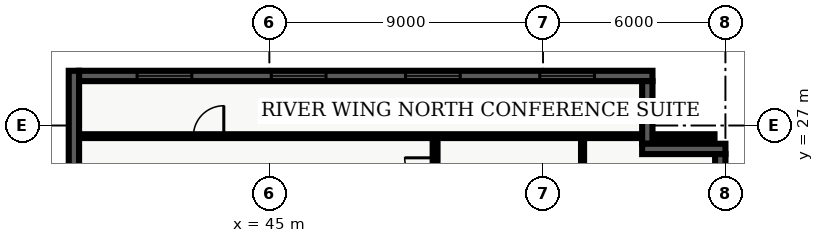
"""IFC4 building model, lengths in metres.
Left out: names, types, materials, properties, quantities, classifications, styles, units other than length and angle.
Written with IfcOpenShell. Run it as: python <this file> out.ifc"""

import sys

from ifc_helpers import new_model, entity, si_unit, converted_unit, direction, frame, origin_with_axes, origin_2d_with_axis, place, context, subcontext, project, spatial, polyline, rectangle, outline, extrude, element, fill, save


model = new_model("IFC4")
c1 = context("Model", 3, precision=1e-05, world=origin_with_axes(), true_north=direction((0.0, 1.0)))
c2 = subcontext(c1, "Body", "Model", "MODEL_VIEW")
j1 = project(units=[si_unit("LENGTHUNIT", "METRE"), converted_unit("PLANEANGLEUNIT", "DEGREE", entity("IfcPlaneAngleMeasure", 0.017), si_unit("PLANEANGLEUNIT", "RADIAN"), dimensions=[0, 0, 0, 0, 0, 0, 0])], contexts=[c1])
p1 = place(None, origin_with_axes())
s1 = spatial("IfcSite", under=j1, at=p1, CompositionType="ELEMENT")
p2 = place(p1, origin_with_axes())
s2 = spatial("IfcBuilding", under=s1, at=p2, CompositionType="ELEMENT")
p3 = place(p2, frame((0.0, 0.0, 200.4), z_axis=(0.0, 0.0, 1.0), x_axis=(1.0, 0.0, 0.0)))
s3 = spatial("IfcBuildingStorey", under=s2, at=p3, CompositionType="ELEMENT", Elevation=200.4)
p4 = place(p3, frame((50.45, 7.85, 0.0), z_axis=(0.0, 0.0, 1.0), x_axis=(0.0, 1.0, 0.0)))
e1 = element("IfcWall", 1, at=p4, inside=s3, PredefinedType="PARTITIONING", context=c2, shape_type="SweptSolid", body=[
    extrude(outline(polyline([(0.0, -0.08), (18.8, -0.08), (18.8, 0.08), (0.0, 0.08), (0.0, -0.08)])), origin_with_axes(), (0.0, 0.0, 1.0), 2.7),
])
p5 = place(p4, frame((4.113, 0.0, 0.0), z_axis=(0.0, 0.0, 1.0), x_axis=(1.0, 0.0, 0.0)))
e2 = element("IfcOpeningElement", 2, at=p5, cuts=e1, PredefinedType="OPENING", context=c2, shape_type="SweptSolid", body=[
    extrude(rectangle(XDim=1.0, YDim=0.18, at=origin_2d_with_axis()), origin_with_axes(), (0.0, 0.0, 1.0), 2.15),
])
p6 = place(p4, frame((7.883, 0.0, 0.0), z_axis=(0.0, 0.0, 1.0), x_axis=(1.0, 0.0, 0.0)))
e3 = element("IfcOpeningElement", 3, at=p6, cuts=e1, PredefinedType="OPENING", context=c2, shape_type="SweptSolid", body=[
    extrude(rectangle(XDim=1.0, YDim=0.18, at=origin_2d_with_axis()), origin_with_axes(), (0.0, 0.0, 1.0), 2.15),
])
p7 = place(p4, frame((11.928, 0.0, 0.0), z_axis=(0.0, 0.0, 1.0), x_axis=(1.0, 0.0, 0.0)))
e4 = element("IfcOpeningElement", 4, at=p7, cuts=e1, PredefinedType="OPENING", context=c2, shape_type="SweptSolid", body=[
    extrude(rectangle(XDim=1.0, YDim=0.18, at=origin_2d_with_axis()), origin_with_axes(), (0.0, 0.0, 1.0), 2.15),
])
p8 = place(p4, frame((17.587, 0.0, 0.0), z_axis=(0.0, 0.0, 1.0), x_axis=(1.0, 0.0, 0.0)))
e5 = element("IfcOpeningElement", 5, at=p8, cuts=e1, PredefinedType="OPENING", context=c2, shape_type="SweptSolid", body=[
    extrude(rectangle(XDim=1.0, YDim=0.18, at=origin_2d_with_axis()), origin_with_axes(), (0.0, 0.0, 1.0), 2.15),
])
p9 = place(p3, frame((38.735, 26.65, 0.0), z_axis=(0.0, 0.0, 1.0), x_axis=(1.0, 0.0, 0.0)))
e6 = element("IfcWall", 6, at=p9, inside=s3, PredefinedType="PARTITIONING", context=c2, shape_type="SweptSolid", body=[
    extrude(outline(polyline([(0.0, -0.062), (20.905, -0.062), (20.905, 0.062), (0.0, 0.062), (0.0, -0.062)])), origin_with_axes(), (0.0, 0.0, 1.0), 2.7),
])
p10 = place(p9, frame((4.265, 0.0, 0.0), z_axis=(0.0, 0.0, 1.0), x_axis=(1.0, 0.0, 0.0)))
e7 = element("IfcOpeningElement", 7, at=p10, cuts=e6, PredefinedType="OPENING", context=c2, shape_type="SweptSolid", body=[
    extrude(rectangle(XDim=1.0, YDim=0.145, at=origin_2d_with_axis()), origin_with_axes(), (0.0, 0.0, 1.0), 2.15),
])
p11 = place(p3, frame((55.3, 7.98, 0.0), z_axis=(0.0, 0.0, 1.0), x_axis=(0.0, 1.0, 0.0)))
e8 = element("IfcWall", 8, at=p11, inside=s3, PredefinedType="PARTITIONING", context=c2, shape_type="SweptSolid", body=[
    extrude(outline(polyline([(0.0, -0.05), (18.54, -0.05), (18.54, 0.05), (0.0, 0.05), (0.0, -0.05)])), origin_with_axes(), (0.0, 0.0, 1.0), 2.7),
])
p12 = place(p11, frame((3.103, 0.0, 0.0), z_axis=(0.0, 0.0, 1.0), x_axis=(1.0, 0.0, 0.0)))
e9 = element("IfcOpeningElement", 9, at=p12, cuts=e8, PredefinedType="OPENING", context=c2, shape_type="SweptSolid", body=[
    extrude(rectangle(XDim=0.95, YDim=0.12, at=origin_2d_with_axis()), origin_with_axes(), (0.0, 0.0, 1.0), 2.15),
])
p13 = place(p11, frame((8.033, 0.0, 0.0), z_axis=(0.0, 0.0, 1.0), x_axis=(1.0, 0.0, 0.0)))
e10 = element("IfcOpeningElement", 10, at=p13, cuts=e8, PredefinedType="OPENING", context=c2, shape_type="SweptSolid", body=[
    extrude(rectangle(XDim=0.95, YDim=0.12, at=origin_2d_with_axis()), origin_with_axes(), (0.0, 0.0, 1.0), 2.15),
])
p14 = place(p11, frame((11.797, 0.0, 0.0), z_axis=(0.0, 0.0, 1.0), x_axis=(1.0, 0.0, 0.0)))
e11 = element("IfcOpeningElement", 11, at=p14, cuts=e8, PredefinedType="OPENING", context=c2, shape_type="SweptSolid", body=[
    extrude(rectangle(XDim=0.95, YDim=0.12, at=origin_2d_with_axis()), origin_with_axes(), (0.0, 0.0, 1.0), 2.15),
])
p15 = place(p11, frame((16.207, 0.0, 0.0), z_axis=(0.0, 0.0, 1.0), x_axis=(1.0, 0.0, 0.0)))
e12 = element("IfcOpeningElement", 12, at=p15, cuts=e8, PredefinedType="OPENING", context=c2, shape_type="SweptSolid", body=[
    extrude(rectangle(XDim=0.95, YDim=0.12, at=origin_2d_with_axis()), origin_with_axes(), (0.0, 0.0, 1.0), 2.15),
])
p16 = place(p3, frame((38.57, 21.26, 0.0), z_axis=(0.0, 0.0, 1.0), x_axis=(0.0, 1.0, 0.0)))
e13 = element("IfcWall", 13, at=p16, inside=s3, PredefinedType="SOLIDWALL", context=c2, shape_type="SweptSolid", body=[
    extrude(outline(polyline([(0.0, -0.17), (7.54, -0.17), (7.54, 0.17), (0.0, 0.17), (0.0, -0.17)])), origin_with_axes(), (0.0, 0.0, 1.0), 3.66),
])
p17 = place(p3, frame((38.74, 28.63, 0.0), z_axis=(0.0, 0.0, 1.0), x_axis=(1.0, 0.0, 0.0)))
e14 = element("IfcWall", 14, at=p17, inside=s3, PredefinedType="SOLIDWALL", context=c2, shape_type="SweptSolid", body=[
    extrude(outline(polyline([(0.0, -0.17), (18.86, -0.17), (18.86, 0.17), (0.0, 0.17), (0.0, -0.17)])), origin_with_axes(), (0.0, 0.0, 1.0), 3.66),
])
p18 = place(p17, frame((2.808, 0.0, 0.45), z_axis=(0.0, 0.0, 1.0), x_axis=(1.0, 0.0, 0.0)))
e15 = element("IfcOpeningElement", 15, at=p18, cuts=e14, PredefinedType="OPENING", context=c2, shape_type="SweptSolid", body=[
    extrude(rectangle(XDim=1.8, YDim=0.36, at=origin_2d_with_axis()), origin_with_axes(), (0.0, 0.0, 1.0), 2.1),
])
p19 = place(p17, frame((7.222, 0.0, 0.45), z_axis=(0.0, 0.0, 1.0), x_axis=(1.0, 0.0, 0.0)))
e16 = element("IfcOpeningElement", 16, at=p19, cuts=e14, PredefinedType="OPENING", context=c2, shape_type="SweptSolid", body=[
    extrude(rectangle(XDim=1.8, YDim=0.36, at=origin_2d_with_axis()), origin_with_axes(), (0.0, 0.0, 1.0), 2.1),
])
p20 = place(p17, frame((11.637, 0.0, 0.45), z_axis=(0.0, 0.0, 1.0), x_axis=(1.0, 0.0, 0.0)))
e17 = element("IfcOpeningElement", 17, at=p20, cuts=e14, PredefinedType="OPENING", context=c2, shape_type="SweptSolid", body=[
    extrude(rectangle(XDim=1.8, YDim=0.36, at=origin_2d_with_axis()), origin_with_axes(), (0.0, 0.0, 1.0), 2.1),
])
p21 = place(p17, frame((16.053, 0.0, 0.45), z_axis=(0.0, 0.0, 1.0), x_axis=(1.0, 0.0, 0.0)))
e18 = element("IfcOpeningElement", 18, at=p21, cuts=e14, PredefinedType="OPENING", context=c2, shape_type="SweptSolid", body=[
    extrude(rectangle(XDim=1.8, YDim=0.36, at=origin_2d_with_axis()), origin_with_axes(), (0.0, 0.0, 1.0), 2.1),
])
p22 = place(p3, frame((57.43, 28.46, 0.0), z_axis=(0.0, 0.0, 1.0), x_axis=(0.0, -1.0, 0.0)))
e19 = element("IfcWall", 19, at=p22, inside=s3, PredefinedType="SOLIDWALL", context=c2, shape_type="SweptSolid", body=[
    extrude(outline(polyline([(0.0, -0.17), (2.06, -0.17), (2.06, 0.17), (0.0, 0.17), (0.0, -0.17)])), origin_with_axes(), (0.0, 0.0, 1.0), 3.66),
])
p23 = place(p3, frame((57.26, 26.23, 0.0), z_axis=(0.0, 0.0, 1.0), x_axis=(1.0, 0.0, 0.0)))
e20 = element("IfcWall", 20, at=p23, inside=s3, PredefinedType="SOLIDWALL", context=c2, shape_type="SweptSolid", body=[
    extrude(outline(polyline([(0.0, -0.17), (2.74, -0.17), (2.74, 0.17), (0.0, 0.17), (0.0, -0.17)])), origin_with_axes(), (0.0, 0.0, 1.0), 3.66),
])
p24 = place(p3, frame((59.83, 26.06, 0.0), z_axis=(0.0, 0.0, 1.0), x_axis=(0.0, -1.0, 0.0)))
e21 = element("IfcWall", 21, at=p24, inside=s3, PredefinedType="SOLIDWALL", context=c2, shape_type="SweptSolid", body=[
    extrude(outline(polyline([(0.0, -0.17), (23.66, -0.17), (23.66, 0.17), (0.0, 0.17), (0.0, -0.17)])), origin_with_axes(), (0.0, 0.0, 1.0), 3.66),
])
p25 = place(p24, frame((20.364, 0.0, 0.45), z_axis=(0.0, 0.0, 1.0), x_axis=(1.0, 0.0, 0.0)))
e22 = element("IfcOpeningElement", 22, at=p25, cuts=e21, PredefinedType="OPENING", context=c2, shape_type="SweptSolid", body=[
    extrude(rectangle(XDim=1.8, YDim=0.36, at=origin_2d_with_axis()), origin_with_axes(), (0.0, 0.0, 1.0), 2.1),
])
p26 = place(p9, frame((4.265, 0.0, 0.0), z_axis=(0.0, 0.0, 1.0), x_axis=(1.0, 0.0, 0.0)))
e23 = element("IfcDoor", 23, at=p26, inside=s3, OperationType="SINGLE_SWING_RIGHT", PredefinedType="DOOR", context=c2, shape_type="SweptSolid", body=[
    extrude(rectangle(XDim=1.0, YDim=0.075, at=origin_2d_with_axis()), origin_with_axes(), (0.0, 0.0, 1.0), 2.15),
])
fill(e7, e23)
p27 = place(p4, frame((17.587, 0.0, 0.0), z_axis=(0.0, 0.0, 1.0), x_axis=(1.0, 0.0, 0.0)))
e24 = element("IfcDoor", 24, at=p27, inside=s3, OperationType="SINGLE_SWING_RIGHT", PredefinedType="DOOR", context=c2, shape_type="SweptSolid", body=[
    extrude(rectangle(XDim=1.0, YDim=0.09, at=origin_2d_with_axis()), origin_with_axes(), (0.0, 0.0, 1.0), 2.15),
])
fill(e5, e24)
p28 = place(p17, frame((2.808, 0.0, 0.45), z_axis=(0.0, 0.0, 1.0), x_axis=(1.0, 0.0, 0.0)))
e25 = element("IfcWindow", 25, at=p28, inside=s3, PredefinedType="WINDOW", context=c2, shape_type="SweptSolid", body=[
    extrude(rectangle(XDim=1.8, YDim=0.09, at=origin_2d_with_axis()), origin_with_axes(), (0.0, 0.0, 1.0), 2.1),
])
fill(e15, e25)
p29 = place(p17, frame((7.222, 0.0, 0.45), z_axis=(0.0, 0.0, 1.0), x_axis=(1.0, 0.0, 0.0)))
e26 = element("IfcWindow", 26, at=p29, inside=s3, PredefinedType="WINDOW", context=c2, shape_type="SweptSolid", body=[
    extrude(rectangle(XDim=1.8, YDim=0.09, at=origin_2d_with_axis()), origin_with_axes(), (0.0, 0.0, 1.0), 2.1),
])
fill(e16, e26)
p30 = place(p17, frame((11.637, 0.0, 0.45), z_axis=(0.0, 0.0, 1.0), x_axis=(1.0, 0.0, 0.0)))
e27 = element("IfcWindow", 27, at=p30, inside=s3, PredefinedType="WINDOW", context=c2, shape_type="SweptSolid", body=[
    extrude(rectangle(XDim=1.8, YDim=0.09, at=origin_2d_with_axis()), origin_with_axes(), (0.0, 0.0, 1.0), 2.1),
])
fill(e17, e27)
p31 = place(p17, frame((16.053, 0.0, 0.45), z_axis=(0.0, 0.0, 1.0), x_axis=(1.0, 0.0, 0.0)))
e28 = element("IfcWindow", 28, at=p31, inside=s3, PredefinedType="WINDOW", context=c2, shape_type="SweptSolid", body=[
    extrude(rectangle(XDim=1.8, YDim=0.09, at=origin_2d_with_axis()), origin_with_axes(), (0.0, 0.0, 1.0), 2.1),
])
fill(e18, e28)
save(model, sys.argv[1])
